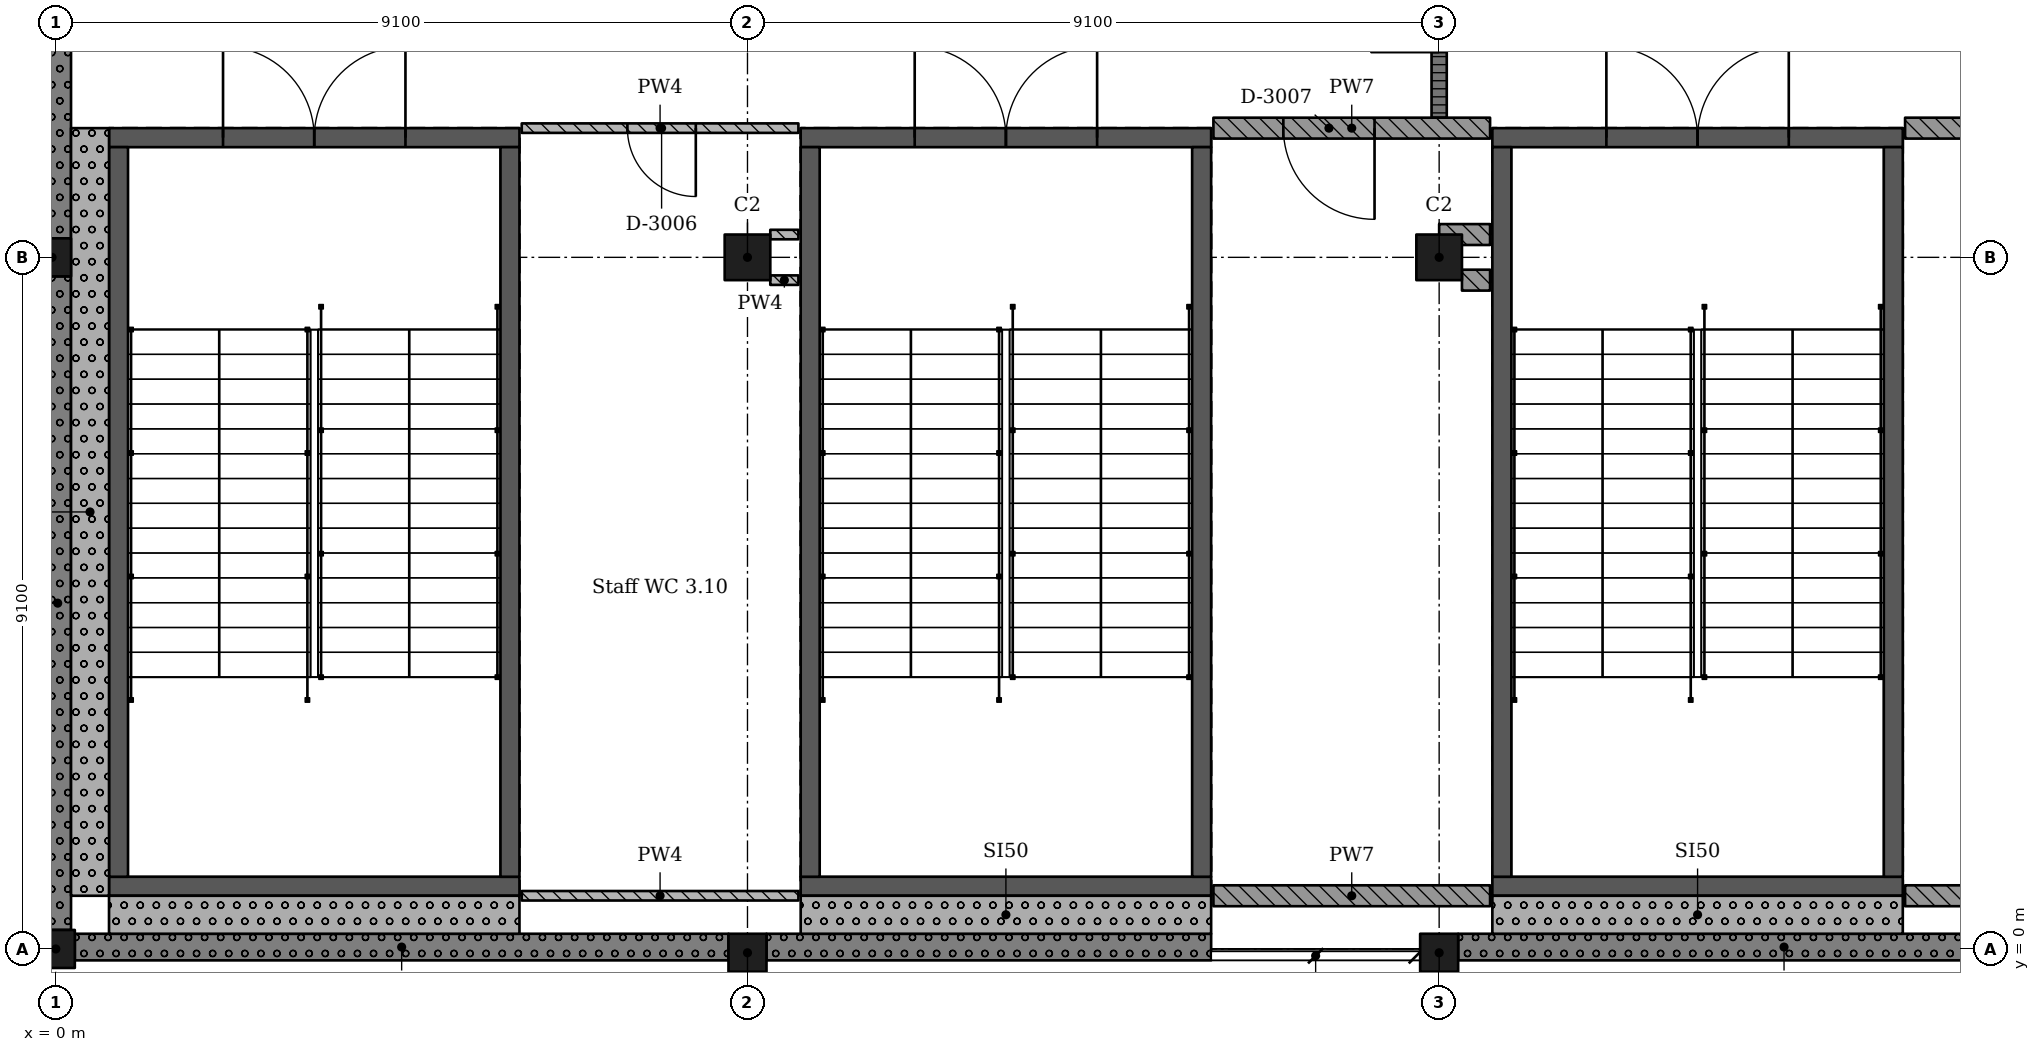
"""IFC4 building model, lengths in metres.
Left out: names, types, materials, properties, quantities, classifications, styles, units other than length and angle.
Written with IfcOpenShell. Run it as: python <this file> out.ifc"""

import sys

from ifc_helpers import new_model, si_unit, direction, frame, frame_2d, origin, origin_2d, place, context, subcontext, project, spatial, rectangle, extrude, element, fill, save


model = new_model("IFC4")
c1 = context("Model", 3, precision=1e-05, world=origin(), true_north=direction((0.0, 1.0)))
c2 = subcontext(c1, "Body", "Model", "MODEL_VIEW")
j1 = project(units=[si_unit("LENGTHUNIT", "METRE"), si_unit("PLANEANGLEUNIT", "RADIAN")], contexts=[c1])
p1 = place(None, origin())
s1 = spatial("IfcSite", under=j1, at=p1, CompositionType="ELEMENT")
p2 = place(p1, origin())
s2 = spatial("IfcBuilding", under=s1, at=p2, CompositionType="ELEMENT")
p3 = place(p2, frame((0.0, 0.0, 15.47)))
s3 = spatial("IfcBuildingStorey", under=s2, at=p3, CompositionType="ELEMENT", Elevation=15.47)
for number, where, z_axis, x_axis in (
    (1, (0.0, 0.0, 0.0), (0.0, 0.0, 1.0), (1.0, 0.0, 0.0)),
    (2, (-0.05, 9.1, 0.0), (0.0, 0.0, 1.0), (1.0, 0.0, 0.0)),
    (3, (9.1, -0.05, 0.0), (0.0, 0.0, 1.0), (1.0, 0.0, 0.0)),
):
    element("IfcColumn", number, at=place(p3, frame(where, z_axis=z_axis, x_axis=x_axis)), inside=s3, PredefinedType="COLUMN", context=c2, shape_type="SweptSolid", body=[
        extrude(rectangle(XDim=0.5, YDim=0.5, at=origin_2d()), origin(), (0.0, 0.0, 1.0), 4.55),
    ])
p4 = place(p3, frame((9.1, 9.1, 0.0), z_axis=(0.0, 0.0, 1.0), x_axis=(1.0, 0.0, 0.0)))
e4 = element("IfcColumn", 4, at=p4, inside=s3, PredefinedType="COLUMN", context=c2, shape_type="SweptSolid", body=[
    extrude(rectangle(XDim=0.6, YDim=0.6, at=origin_2d()), origin(), (0.0, 0.0, 1.0), 4.55),
])
p5 = place(p3, frame((18.2, -0.05, 0.0), z_axis=(0.0, 0.0, 1.0), x_axis=(1.0, 0.0, 0.0)))
e5 = element("IfcColumn", 5, at=p5, inside=s3, PredefinedType="COLUMN", context=c2, shape_type="SweptSolid", body=[
    extrude(rectangle(XDim=0.5, YDim=0.5, at=origin_2d()), origin(), (0.0, 0.0, 1.0), 4.55),
])
p6 = place(p3, frame((18.2, 9.1, 0.0), z_axis=(0.0, 0.0, 1.0), x_axis=(1.0, 0.0, 0.0)))
e6 = element("IfcColumn", 6, at=p6, inside=s3, PredefinedType="COLUMN", context=c2, shape_type="SweptSolid", body=[
    extrude(rectangle(XDim=0.6, YDim=0.6, at=origin_2d()), origin(), (0.0, 0.0, 1.0), 4.55),
])
p7 = place(p3, frame((6.1, 0.825, 0.0), z_axis=(0.0, 0.0, 1.0), x_axis=(-1.0, 0.0, 0.0)))
e7 = element("IfcWall", 7, at=p7, inside=s3, PredefinedType="SHEAR", context=c2, shape_type="SweptSolid", body=[
    extrude(rectangle(XDim=5.4, YDim=0.25, at=frame_2d((2.7, 0.0))), origin(), (0.0, 0.0, 1.0), 4.55),
])
p8 = place(p3, frame((6.1, 10.675, 0.0), z_axis=(0.0, 0.0, 1.0), x_axis=(-1.0, 0.0, 0.0)))
e8 = element("IfcWall", 8, at=p8, inside=s3, PredefinedType="SHEAR", context=c2, shape_type="SweptSolid", body=[
    extrude(rectangle(XDim=5.4, YDim=0.25, at=frame_2d((2.7, 0.0))), origin(), (0.0, 0.0, 1.0), 4.55),
])
p9 = place(p8, frame((1.5, 0.0, 0.0)))
e9 = element("IfcOpeningElement", 9, at=p9, cuts=e8, PredefinedType="OPENING", context=c2, shape_type="SweptSolid", body=[
    extrude(rectangle(XDim=2.4, YDim=2.1, at=frame_2d((1.2, 1.05))), frame((0.0, 0.135, 0.0), z_axis=(0.0, -1.0, 0.0), x_axis=(1.0, 0.0, 0.0)), (0.0, 0.0, 1.0), 0.27),
])
for number, where, z_axis, x_axis in (
    (10, (0.825, 10.55, 0.0), (0.0, 0.0, 1.0), (0.0, -1.0, 0.0)),
    (11, (5.975, 10.55, 0.0), (0.0, 0.0, 1.0), (0.0, -1.0, 0.0)),
):
    element("IfcWall", number, at=place(p3, frame(where, z_axis=z_axis, x_axis=x_axis)), inside=s3, PredefinedType="SHEAR", context=c2, shape_type="SweptSolid", body=[
        extrude(rectangle(XDim=9.6, YDim=0.25, at=frame_2d((4.8, 0.0))), origin(), (0.0, 0.0, 1.0), 4.55),
    ])
p10 = place(p3, frame((15.2, 0.825, 0.0), z_axis=(0.0, 0.0, 1.0), x_axis=(-1.0, 0.0, 0.0)))
e12 = element("IfcWall", 12, at=p10, inside=s3, PredefinedType="SHEAR", context=c2, shape_type="SweptSolid", body=[
    extrude(rectangle(XDim=5.4, YDim=0.25, at=frame_2d((2.7, 0.0))), origin(), (0.0, 0.0, 1.0), 4.55),
])
p11 = place(p3, frame((15.2, 10.675, 0.0), z_axis=(0.0, 0.0, 1.0), x_axis=(-1.0, 0.0, 0.0)))
e13 = element("IfcWall", 13, at=p11, inside=s3, PredefinedType="SHEAR", context=c2, shape_type="SweptSolid", body=[
    extrude(rectangle(XDim=5.4, YDim=0.25, at=frame_2d((2.7, 0.0))), origin(), (0.0, 0.0, 1.0), 4.55),
])
p12 = place(p11, frame((1.5, 0.0, 0.0)))
e14 = element("IfcOpeningElement", 14, at=p12, cuts=e13, PredefinedType="OPENING", context=c2, shape_type="SweptSolid", body=[
    extrude(rectangle(XDim=2.4, YDim=2.1, at=frame_2d((1.2, 1.05))), frame((0.0, 0.135, 0.0), z_axis=(0.0, -1.0, 0.0), x_axis=(1.0, 0.0, 0.0)), (0.0, 0.0, 1.0), 0.27),
])
for number, where, z_axis, x_axis in (
    (15, (9.925, 10.55, 0.0), (0.0, 0.0, 1.0), (0.0, -1.0, 0.0)),
    (16, (15.075, 10.55, 0.0), (0.0, 0.0, 1.0), (0.0, -1.0, 0.0)),
):
    element("IfcWall", number, at=place(p3, frame(where, z_axis=z_axis, x_axis=x_axis)), inside=s3, PredefinedType="SHEAR", context=c2, shape_type="SweptSolid", body=[
        extrude(rectangle(XDim=9.6, YDim=0.25, at=frame_2d((4.8, 0.0))), origin(), (0.0, 0.0, 1.0), 4.55),
    ])
p13 = place(p3, frame((24.3, 0.825, 0.0), z_axis=(0.0, 0.0, 1.0), x_axis=(-1.0, 0.0, 0.0)))
e17 = element("IfcWall", 17, at=p13, inside=s3, PredefinedType="SHEAR", context=c2, shape_type="SweptSolid", body=[
    extrude(rectangle(XDim=5.4, YDim=0.25, at=frame_2d((2.7, 0.0))), origin(), (0.0, 0.0, 1.0), 4.55),
])
p14 = place(p3, frame((24.3, 10.675, 0.0), z_axis=(0.0, 0.0, 1.0), x_axis=(-1.0, 0.0, 0.0)))
e18 = element("IfcWall", 18, at=p14, inside=s3, PredefinedType="SHEAR", context=c2, shape_type="SweptSolid", body=[
    extrude(rectangle(XDim=5.4, YDim=0.25, at=frame_2d((2.7, 0.0))), origin(), (0.0, 0.0, 1.0), 4.55),
])
p15 = place(p14, frame((1.5, 0.0, 0.0)))
e19 = element("IfcOpeningElement", 19, at=p15, cuts=e18, PredefinedType="OPENING", context=c2, shape_type="SweptSolid", body=[
    extrude(rectangle(XDim=2.4, YDim=2.1, at=frame_2d((1.2, 1.05))), frame((0.0, 0.135, 0.0), z_axis=(0.0, -1.0, 0.0), x_axis=(1.0, 0.0, 0.0)), (0.0, 0.0, 1.0), 0.27),
])
for number, where, z_axis, x_axis in (
    (20, (19.025, 10.55, 0.0), (0.0, 0.0, 1.0), (0.0, -1.0, 0.0)),
    (21, (24.175, 10.55, 0.0), (0.0, 0.0, 1.0), (0.0, -1.0, 0.0)),
):
    element("IfcWall", number, at=place(p3, frame(where, z_axis=z_axis, x_axis=x_axis)), inside=s3, PredefinedType="SHEAR", context=c2, shape_type="SweptSolid", body=[
        extrude(rectangle(XDim=9.6, YDim=0.25, at=frame_2d((4.8, 0.0))), origin(), (0.0, 0.0, 1.0), 4.55),
    ])
p16 = place(p3, frame((0.25, 0.025, 0.0), z_axis=(0.0, 0.0, 1.0), x_axis=(1.0, 0.0, 0.0)))
e22 = element("IfcWall", 22, at=p16, inside=s3, PredefinedType="SOLIDWALL", context=c2, shape_type="SweptSolid", body=[
    extrude(rectangle(XDim=8.6, YDim=0.35, at=frame_2d((4.3, 0.0))), origin(), (0.0, 0.0, 1.0), 3.55),
])
p17 = place(p3, frame((9.35, 0.025, 0.0), z_axis=(0.0, 0.0, 1.0), x_axis=(1.0, 0.0, 0.0)))
e23 = element("IfcWall", 23, at=p17, inside=s3, PredefinedType="SOLIDWALL", context=c2, shape_type="SweptSolid", body=[
    extrude(rectangle(XDim=5.85, YDim=0.35, at=frame_2d((2.925, 0.0))), origin(), (0.0, 0.0, 1.0), 3.55),
])
p18 = place(p3, frame((18.45, 0.025, 0.0), z_axis=(0.0, 0.0, 1.0), x_axis=(1.0, 0.0, 0.0)))
e24 = element("IfcWall", 24, at=p18, inside=s3, PredefinedType="SOLIDWALL", context=c2, shape_type="SweptSolid", body=[
    extrude(rectangle(XDim=8.575, YDim=0.35, at=frame_2d((4.288, 0.0))), origin(), (0.0, 0.0, 1.0), 3.55),
])
p19 = place(p3, frame((0.025, 17.9, 0.0), z_axis=(0.0, 0.0, 1.0), x_axis=(0.0, -1.0, 0.0)))
e25 = element("IfcWall", 25, at=p19, inside=s3, PredefinedType="SOLIDWALL", context=c2, shape_type="SweptSolid", body=[
    extrude(rectangle(XDim=8.55, YDim=0.35, at=frame_2d((4.275, 0.0))), origin(), (0.0, 0.0, 1.0), 3.55),
])
p20 = place(p3, frame((0.025, 8.85, 0.0), z_axis=(0.0, 0.0, 1.0), x_axis=(0.0, -1.0, 0.0)))
e26 = element("IfcWall", 26, at=p20, inside=s3, PredefinedType="SOLIDWALL", context=c2, shape_type="SweptSolid", body=[
    extrude(rectangle(XDim=8.6, YDim=0.35, at=frame_2d((4.3, 0.0))), origin(), (0.0, 0.0, 1.0), 3.55),
])
p21 = place(p3, frame((0.7, 0.45, 0.0), z_axis=(0.0, 0.0, 1.0), x_axis=(1.0, 0.0, 0.0)))
e27 = element("IfcWall", 27, at=p21, inside=s3, PredefinedType="SOLIDWALL", context=c2, shape_type="SweptSolid", body=[
    extrude(rectangle(XDim=5.4, YDim=0.5, at=frame_2d((2.7, 0.0))), origin(), (0.0, 0.0, 1.0), 4.3),
])
p22 = place(p3, frame((0.45, 0.7, 0.0), z_axis=(0.0, 0.0, 1.0), x_axis=(0.0, 1.0, 0.0)))
e28 = element("IfcWall", 28, at=p22, inside=s3, PredefinedType="SOLIDWALL", context=c2, shape_type="SweptSolid", body=[
    extrude(rectangle(XDim=10.1, YDim=0.5, at=frame_2d((5.05, 0.0))), origin(), (0.0, 0.0, 1.0), 4.3),
])
p23 = place(p3, frame((9.8, 0.45, 0.0), z_axis=(0.0, 0.0, 1.0), x_axis=(1.0, 0.0, 0.0)))
e29 = element("IfcWall", 29, at=p23, inside=s3, PredefinedType="SOLIDWALL", context=c2, shape_type="SweptSolid", body=[
    extrude(rectangle(XDim=5.4, YDim=0.5, at=frame_2d((2.7, 0.0))), origin(), (0.0, 0.0, 1.0), 4.3),
])
p24 = place(p3, frame((18.9, 0.45, 0.0), z_axis=(0.0, 0.0, 1.0), x_axis=(1.0, 0.0, 0.0)))
e30 = element("IfcWall", 30, at=p24, inside=s3, PredefinedType="SOLIDWALL", context=c2, shape_type="SweptSolid", body=[
    extrude(rectangle(XDim=5.4, YDim=0.5, at=frame_2d((2.7, 0.0))), origin(), (0.0, 0.0, 1.0), 4.3),
])
p25 = place(p3, frame((9.4, 8.8, 0.0), z_axis=(0.0, 0.0, 1.0), x_axis=(1.0, 0.0, 0.0)))
e31 = element("IfcWall", 31, at=p25, inside=s3, PredefinedType="PARTITIONING", context=c2, shape_type="SweptSolid", body=[
    extrude(rectangle(XDim=0.37, YDim=0.125, at=frame_2d((0.185, 0.0))), origin(), (0.0, 0.0, 1.0), 4.3),
])
p26 = place(p3, frame((9.77, 0.7, 0.0), z_axis=(0.0, 0.0, 1.0), x_axis=(-1.0, 0.0, 0.0)))
e32 = element("IfcWall", 32, at=p26, inside=s3, PredefinedType="PARTITIONING", context=c2, shape_type="SweptSolid", body=[
    extrude(rectangle(XDim=3.64, YDim=0.125, at=frame_2d((1.82, 0.0))), origin(), (0.0, 0.0, 1.0), 4.3),
])
p27 = place(p3, frame((9.77, 9.4, 0.0), z_axis=(0.0, 0.0, 1.0), x_axis=(-1.0, 0.0, 0.0)))
e33 = element("IfcWall", 33, at=p27, inside=s3, PredefinedType="PARTITIONING", context=c2, shape_type="SweptSolid", body=[
    extrude(rectangle(XDim=0.37, YDim=0.125, at=frame_2d((0.185, 0.0))), origin(), (0.0, 0.0, 1.0), 4.3),
])
p28 = place(p3, frame((9.77, 10.8, 0.0), z_axis=(0.0, 0.0, 1.0), x_axis=(-1.0, 0.0, 0.0)))
e34 = element("IfcWall", 34, at=p28, inside=s3, PredefinedType="PARTITIONING", context=c2, shape_type="SweptSolid", body=[
    extrude(rectangle(XDim=3.64, YDim=0.125, at=frame_2d((1.82, 0.0))), origin(), (0.0, 0.0, 1.0), 4.3),
])
p29 = place(p28, frame((1.35, 0.0, 0.0)))
e35 = element("IfcOpeningElement", 35, at=p29, cuts=e34, PredefinedType="OPENING", context=c2, shape_type="SweptSolid", body=[
    extrude(rectangle(XDim=0.9, YDim=2.1, at=frame_2d((0.45, 1.05))), frame((0.0, 0.073, 0.0), z_axis=(0.0, -1.0, 0.0), x_axis=(1.0, 0.0, 0.0)), (0.0, 0.0, 1.0), 0.145),
])
p30 = place(p3, frame((18.2, 9.4, 0.0), z_axis=(0.0, 0.0, 1.0), x_axis=(1.0, 0.0, 0.0)))
e36 = element("IfcWall", 36, at=p30, inside=s3, PredefinedType="SOLIDWALL", context=c2, shape_type="SweptSolid", body=[
    extrude(rectangle(XDim=0.67, YDim=0.275, at=frame_2d((0.335, 0.0))), origin(), (0.0, 0.0, 1.0), 4.3),
])
p31 = place(p3, frame((15.23, 10.8, 0.0), z_axis=(0.0, 0.0, 1.0), x_axis=(1.0, 0.0, 0.0)))
e37 = element("IfcWall", 37, at=p31, inside=s3, PredefinedType="SOLIDWALL", context=c2, shape_type="SweptSolid", body=[
    extrude(rectangle(XDim=3.64, YDim=0.275, at=frame_2d((1.82, 0.0))), origin(), (0.0, 0.0, 1.0), 4.3),
])
p32 = place(p31, frame((0.92, 0.0, 0.0)))
e38 = element("IfcOpeningElement", 38, at=p32, cuts=e37, PredefinedType="OPENING", context=c2, shape_type="SweptSolid", body=[
    extrude(rectangle(XDim=1.2, YDim=2.4, at=frame_2d((0.6, 1.2))), frame((0.0, 0.147, 0.0), z_axis=(0.0, -1.0, 0.0), x_axis=(1.0, 0.0, 0.0)), (0.0, 0.0, 1.0), 0.295),
])
p33 = place(p3, frame((18.2, 17.85, 0.0), z_axis=(0.0, 0.0, 1.0), x_axis=(0.0, -1.0, 0.0)))
e39 = element("IfcWall", 39, at=p33, inside=s3, PredefinedType="PARTITIONING", context=c2, shape_type="SweptSolid", body=[
    extrude(rectangle(XDim=6.913, YDim=0.2, at=frame_2d((3.456, 0.0))), origin(), (0.0, 0.0, 1.0), 3.55),
])
p34 = place(p33, frame((0.85, 0.0, 0.0)))
e40 = element("IfcOpeningElement", 40, at=p34, cuts=e39, PredefinedType="OPENING", context=c2, shape_type="SweptSolid", body=[
    extrude(rectangle(XDim=1.8, YDim=2.4, at=frame_2d((0.9, 1.2))), frame((0.0, 0.11, 0.0), z_axis=(0.0, -1.0, 0.0), x_axis=(1.0, 0.0, 0.0)), (0.0, 0.0, 1.0), 0.22),
])
p35 = place(p33, frame((4.25, 0.0, 0.0)))
e41 = element("IfcOpeningElement", 41, at=p35, cuts=e39, PredefinedType="OPENING", context=c2, shape_type="SweptSolid", body=[
    extrude(rectangle(XDim=1.8, YDim=2.4, at=frame_2d((0.9, 1.2))), frame((0.0, 0.11, 0.0), z_axis=(0.0, -1.0, 0.0), x_axis=(1.0, 0.0, 0.0)), (0.0, 0.0, 1.0), 0.22),
])
p36 = place(p3, frame((18.5, 8.8, 0.0), z_axis=(0.0, 0.0, 1.0), x_axis=(1.0, 0.0, 0.0)))
e42 = element("IfcWall", 42, at=p36, inside=s3, PredefinedType="SOLIDWALL", context=c2, shape_type="SweptSolid", body=[
    extrude(rectangle(XDim=0.37, YDim=0.275, at=frame_2d((0.185, 0.0))), origin(), (0.0, 0.0, 1.0), 4.3),
])
p37 = place(p3, frame((18.87, 0.7, 0.0), z_axis=(0.0, 0.0, 1.0), x_axis=(-1.0, 0.0, 0.0)))
e43 = element("IfcWall", 43, at=p37, inside=s3, PredefinedType="SOLIDWALL", context=c2, shape_type="SweptSolid", body=[
    extrude(rectangle(XDim=3.64, YDim=0.275, at=frame_2d((1.82, 0.0))), origin(), (0.0, 0.0, 1.0), 4.3),
])
p38 = place(p3, frame((28.2, 10.8, 0.0), z_axis=(0.0, 0.0, 1.0), x_axis=(-1.0, 0.0, 0.0)))
e44 = element("IfcWall", 44, at=p38, inside=s3, PredefinedType="SOLIDWALL", context=c2, shape_type="SweptSolid", body=[
    extrude(rectangle(XDim=3.87, YDim=0.275, at=frame_2d((1.935, 0.0))), origin(), (0.0, 0.0, 1.0), 4.3),
])
p39 = place(p38, frame((1.35, 0.0, 0.0)))
e45 = element("IfcOpeningElement", 45, at=p39, cuts=e44, PredefinedType="OPENING", context=c2, shape_type="SweptSolid", body=[
    extrude(rectangle(XDim=1.2, YDim=2.4, at=frame_2d((0.6, 1.2))), frame((0.0, 0.147, 0.0), z_axis=(0.0, -1.0, 0.0), x_axis=(1.0, 0.0, 0.0)), (0.0, 0.0, 1.0), 0.295),
])
p40 = place(p3, frame((28.238, 0.7, 0.0), z_axis=(0.0, 0.0, 1.0), x_axis=(-1.0, 0.0, 0.0)))
e46 = element("IfcWall", 46, at=p40, inside=s3, PredefinedType="SOLIDWALL", context=c2, shape_type="SweptSolid", body=[
    extrude(rectangle(XDim=3.907, YDim=0.275, at=frame_2d((1.954, 0.0))), origin(), (0.0, 0.0, 1.0), 4.3),
])
p41 = place(p29, origin())
e47 = element("IfcDoor", 47, at=p41, inside=s3, OperationType="SINGLE_SWING_RIGHT", PredefinedType="DOOR", context=c2, shape_type="SweptSolid", body=[
    extrude(rectangle(XDim=0.9, YDim=2.1, at=frame_2d((0.45, 1.05))), frame((0.0, 0.025, 0.0), z_axis=(0.0, -1.0, 0.0), x_axis=(1.0, 0.0, 0.0)), (0.0, 0.0, 1.0), 0.05),
])
fill(e35, e47)
p42 = place(p32, origin())
e48 = element("IfcDoor", 48, at=p42, inside=s3, OperationType="SINGLE_SWING_RIGHT", PredefinedType="DOOR", context=c2, shape_type="SweptSolid", body=[
    extrude(rectangle(XDim=1.2, YDim=2.4, at=frame_2d((0.6, 1.2))), frame((0.0, 0.025, 0.0), z_axis=(0.0, -1.0, 0.0), x_axis=(1.0, 0.0, 0.0)), (0.0, 0.0, 1.0), 0.05),
])
fill(e38, e48)
p43 = place(p9, origin())
e49 = element("IfcDoor", 49, at=p43, inside=s3, OperationType="DOUBLE_DOOR_SINGLE_SWING", PredefinedType="DOOR", context=c2, shape_type="SweptSolid", body=[
    extrude(rectangle(XDim=2.4, YDim=2.1, at=frame_2d((1.2, 1.05))), frame((0.0, 0.025, 0.0), z_axis=(0.0, -1.0, 0.0), x_axis=(1.0, 0.0, 0.0)), (0.0, 0.0, 1.0), 0.05),
])
fill(e9, e49)
p44 = place(p12, origin())
e50 = element("IfcDoor", 50, at=p44, inside=s3, OperationType="DOUBLE_DOOR_SINGLE_SWING", PredefinedType="DOOR", context=c2, shape_type="SweptSolid", body=[
    extrude(rectangle(XDim=2.4, YDim=2.1, at=frame_2d((1.2, 1.05))), frame((0.0, 0.025, 0.0), z_axis=(0.0, -1.0, 0.0), x_axis=(1.0, 0.0, 0.0)), (0.0, 0.0, 1.0), 0.05),
])
fill(e14, e50)
p45 = place(p15, origin())
e51 = element("IfcDoor", 51, at=p45, inside=s3, OperationType="DOUBLE_DOOR_SINGLE_SWING", PredefinedType="DOOR", context=c2, shape_type="SweptSolid", body=[
    extrude(rectangle(XDim=2.4, YDim=2.1, at=frame_2d((1.2, 1.05))), frame((0.0, 0.025, 0.0), z_axis=(0.0, -1.0, 0.0), x_axis=(1.0, 0.0, 0.0)), (0.0, 0.0, 1.0), 0.05),
])
fill(e19, e51)
save(model, sys.argv[1])
